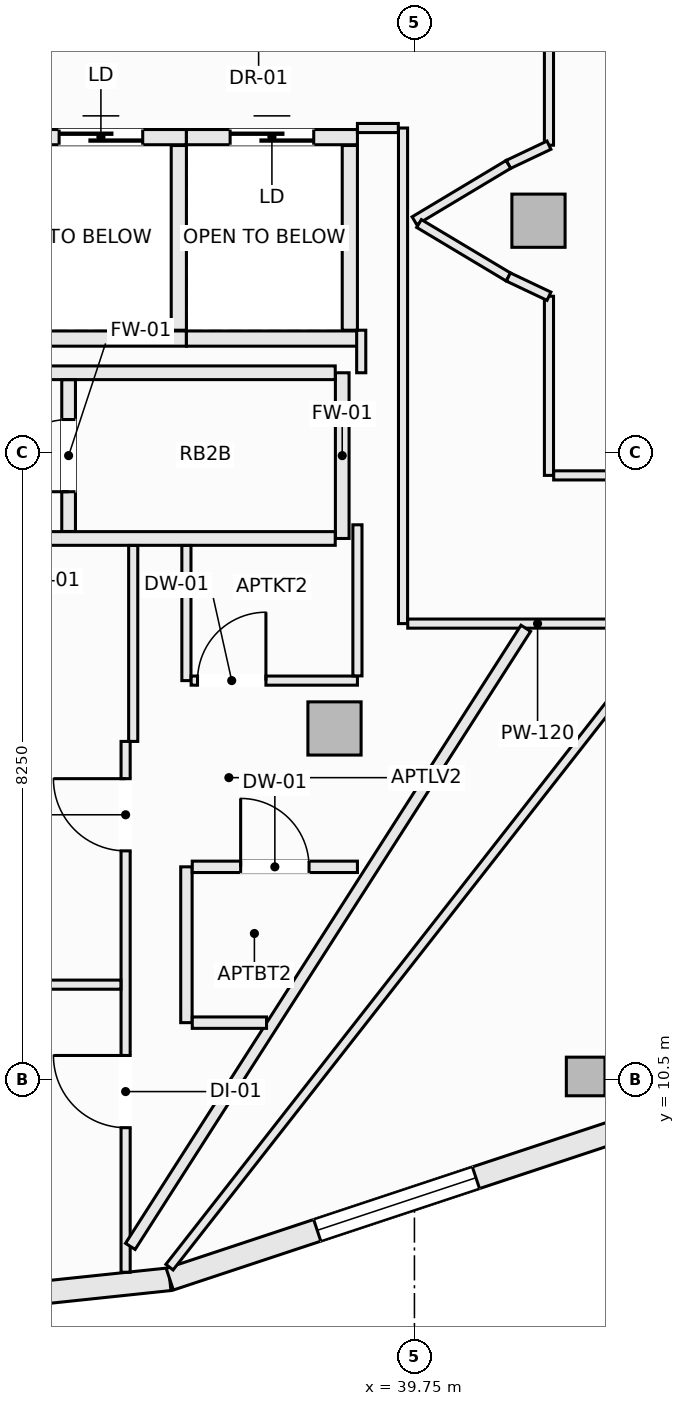
"""IFC4 building model, lengths in metres.
Left out: names, types, materials, properties, quantities, classifications, styles, units other than length and angle.
Written with IfcOpenShell. Run it as: python <this file> out.ifc"""

import sys

from ifc_helpers import new_model, si_unit, direction, frame, frame_2d, origin, origin_2d, place, context, subcontext, project, spatial, rectangle, hollow_rectangle, extrude, element, fill, save


model = new_model("IFC4")
c1 = context("Model", 3, precision=1e-05, world=origin(), true_north=direction((0.0, 1.0)))
c2 = subcontext(c1, "Body", "Model", "MODEL_VIEW")
j1 = project(units=[si_unit("LENGTHUNIT", "METRE"), si_unit("PLANEANGLEUNIT", "RADIAN")], contexts=[c1])
p1 = place(None, origin())
s1 = spatial("IfcSite", under=j1, at=p1, CompositionType="ELEMENT")
p2 = place(p1, origin())
s2 = spatial("IfcBuilding", under=s1, at=p2, CompositionType="ELEMENT")
p3 = place(p2, frame((0.0, 0.0, 209.6)))
s3 = spatial("IfcBuildingStorey", under=s2, at=p3, CompositionType="ELEMENT", Elevation=209.6)
p4 = place(p3, frame((42.003, 10.542, -0.27), z_axis=(0.0, 0.0, 1.0), x_axis=(1.0, 0.0, 0.0)))
e1 = element("IfcColumn", 1, at=p4, inside=s3, PredefinedType="COLUMN", context=c2, shape_type="SweptSolid", body=[
    extrude(hollow_rectangle(XDim=0.508, YDim=0.508, WallThickness=0.019, at=origin_2d()), origin(), (0.0, 0.0, 1.0), 3.3),
])
for number, where, z_axis, x_axis in (
    (2, (38.698, 15.121, -0.27), (0.0, 0.0, 1.0), (1.0, 0.0, 0.0)),
    (3, (41.382, 21.801, -0.27), (0.0, 0.0, 1.0), (1.0, 0.0, 0.0)),
):
    element("IfcColumn", number, at=place(p3, frame(where, z_axis=z_axis, x_axis=x_axis)), inside=s3, PredefinedType="COLUMN", context=c2, shape_type="SweptSolid", body=[
        extrude(rectangle(XDim=0.7, YDim=0.7, at=origin_2d()), origin(), (0.0, 0.0, 1.0), 3.3),
    ])
p5 = place(p3, frame((30.125, 7.2, 0.0), z_axis=(0.0, 0.0, 1.0), x_axis=(0.994497142298, 0.104763705363, 0.0)))
e4 = element("IfcWall", 4, at=p5, inside=s3, PredefinedType="SOLIDWALL", context=c2, shape_type="SweptSolid", body=[
    extrude(rectangle(XDim=6.441, YDim=0.3, at=frame_2d((3.221, 0.0))), origin(), (0.0, 0.0, 1.0), 2.605),
])
p6 = place(p5, frame((2.45, 0.0, 0.72)))
e5 = element("IfcOpeningElement", 5, at=p6, cuts=e4, PredefinedType="OPENING", context=c2, shape_type="SweptSolid", body=[
    extrude(rectangle(XDim=2.2, YDim=1.65, at=frame_2d((1.1, 0.825))), frame((0.0, 0.16, 0.0), z_axis=(0.0, -1.0, 0.0), x_axis=(1.0, 0.0, 0.0)), (0.0, 0.0, 1.0), 0.32),
])
p7 = place(p3, frame((36.531, 7.875, 0.0), z_axis=(0.0, 0.0, 1.0), x_axis=(0.949240877604, 0.314550085495, 0.0)))
e6 = element("IfcWall", 6, at=p7, inside=s3, PredefinedType="SOLIDWALL", context=c2, shape_type="SweptSolid", body=[
    extrude(rectangle(XDim=6.288, YDim=0.3, at=frame_2d((3.144, 0.0))), origin(), (0.0, 0.0, 1.0), 2.605),
])
p8 = place(p7, frame((2.044, 0.0, 0.72)))
e7 = element("IfcOpeningElement", 7, at=p8, cuts=e6, PredefinedType="OPENING", context=c2, shape_type="SweptSolid", body=[
    extrude(rectangle(XDim=2.2, YDim=1.65, at=frame_2d((1.1, 0.825))), frame((0.0, 0.16, 0.0), z_axis=(0.0, -1.0, 0.0), x_axis=(1.0, 0.0, 0.0)), (0.0, 0.0, 1.0), 0.32),
])
p9 = place(p3, frame((34.5, 22.9, 0.0), z_axis=(0.0, 0.0, 1.0), x_axis=(1.0, 0.0, 0.0)))
e8 = element("IfcWall", 8, at=p9, inside=s3, PredefinedType="SOLIDWALL", context=c2, shape_type="SweptSolid", body=[
    extrude(rectangle(XDim=2.25, YDim=0.2, at=frame_2d((1.125, 0.0))), origin(), (0.0, 0.0, 1.0), 3.03),
])
p10 = place(p9, frame((0.575, 0.0, 0.0)))
e9 = element("IfcOpeningElement", 9, at=p10, cuts=e8, PredefinedType="OPENING", context=c2, shape_type="SweptSolid", body=[
    extrude(rectangle(XDim=1.1, YDim=2.2, at=frame_2d((0.55, 1.1))), frame((0.0, 0.11, 0.0), z_axis=(0.0, -1.0, 0.0), x_axis=(1.0, 0.0, 0.0)), (0.0, 0.0, 1.0), 0.22),
])
p11 = place(p3, frame((34.5, 20.25, 0.0), z_axis=(0.0, 0.0, 1.0), x_axis=(1.0, 0.0, 0.0)))
e10 = element("IfcWall", 10, at=p11, inside=s3, PredefinedType="SOLIDWALL", context=c2, shape_type="SweptSolid", body=[
    extrude(rectangle(XDim=2.25, YDim=0.2, at=frame_2d((1.125, 0.0))), origin(), (0.0, 0.0, 1.0), 3.03),
])
p12 = place(p3, frame((36.65, 20.36, 0.0), z_axis=(0.0, 0.0, 1.0), x_axis=(0.0, 1.0, 0.0)))
e11 = element("IfcWall", 11, at=p12, inside=s3, PredefinedType="SOLIDWALL", context=c2, shape_type="SweptSolid", body=[
    extrude(rectangle(XDim=2.43, YDim=0.2, at=frame_2d((1.215, 0.0))), origin(), (0.0, 0.0, 1.0), 3.03),
])
p13 = place(p3, frame((36.75, 22.9, 0.0), z_axis=(0.0, 0.0, 1.0), x_axis=(1.0, 0.0, 0.0)))
e12 = element("IfcWall", 12, at=p13, inside=s3, PredefinedType="SOLIDWALL", context=c2, shape_type="SweptSolid", body=[
    extrude(rectangle(XDim=2.25, YDim=0.2, at=frame_2d((1.125, 0.0))), origin(), (0.0, 0.0, 1.0), 3.03),
])
p14 = place(p13, frame((0.575, 0.0, 0.0)))
e13 = element("IfcOpeningElement", 13, at=p14, cuts=e12, PredefinedType="OPENING", context=c2, shape_type="SweptSolid", body=[
    extrude(rectangle(XDim=1.1, YDim=2.2, at=frame_2d((0.55, 1.1))), frame((0.0, 0.11, 0.0), z_axis=(0.0, -1.0, 0.0), x_axis=(1.0, 0.0, 0.0)), (0.0, 0.0, 1.0), 0.22),
])
p15 = place(p3, frame((36.75, 20.25, 0.0), z_axis=(0.0, 0.0, 1.0), x_axis=(1.0, 0.0, 0.0)))
e14 = element("IfcWall", 14, at=p15, inside=s3, PredefinedType="SOLIDWALL", context=c2, shape_type="SweptSolid", body=[
    extrude(rectangle(XDim=2.25, YDim=0.2, at=frame_2d((1.125, 0.0))), origin(), (0.0, 0.0, 1.0), 3.03),
])
p16 = place(p3, frame((38.9, 20.36, 0.0), z_axis=(0.0, 0.0, 1.0), x_axis=(0.0, 1.0, 0.0)))
e15 = element("IfcWall", 15, at=p16, inside=s3, PredefinedType="SOLIDWALL", context=c2, shape_type="SweptSolid", body=[
    extrude(rectangle(XDim=2.43, YDim=0.2, at=frame_2d((1.215, 0.0))), origin(), (0.0, 0.0, 1.0), 3.03),
])
p17 = place(p3, frame((38.8, 17.62, 0.0), z_axis=(0.0, 0.0, 1.0), x_axis=(0.0, 1.0, 0.0)))
e16 = element("IfcWall", 16, at=p17, inside=s3, PredefinedType="SOLIDWALL", context=c2, shape_type="SweptSolid", body=[
    extrude(rectangle(XDim=2.18, YDim=0.18, at=frame_2d((1.09, 0.0))), origin(), (0.0, 0.0, 1.0), 3.03),
])
p18 = place(p3, frame((30.062, 17.62, 0.0), z_axis=(0.0, 0.0, 1.0), x_axis=(1.0, 0.0, 0.0)))
e17 = element("IfcWall", 17, at=p18, inside=s3, PredefinedType="SOLIDWALL", context=c2, shape_type="SweptSolid", body=[
    extrude(rectangle(XDim=8.646, YDim=0.18, at=frame_2d((4.323, 0.0))), origin(), (0.0, 0.0, 1.0), 3.03),
])
p19 = place(p18, frame((2.299, 0.0, 0.0)))
e18 = element("IfcOpeningElement", 18, at=p19, cuts=e17, PredefinedType="OPENING", context=c2, shape_type="SweptSolid", body=[
    extrude(rectangle(XDim=0.95, YDim=2.1, at=frame_2d((0.475, 1.05))), frame((0.0, 0.1, 0.0), z_axis=(0.0, -1.0, 0.0), x_axis=(1.0, 0.0, 0.0)), (0.0, 0.0, 1.0), 0.2),
])
p20 = place(p3, frame((30.062, 19.8, 0.0), z_axis=(0.0, 0.0, 1.0), x_axis=(1.0, 0.0, 0.0)))
e19 = element("IfcWall", 19, at=p20, inside=s3, PredefinedType="SOLIDWALL", context=c2, shape_type="SweptSolid", body=[
    extrude(rectangle(XDim=8.646, YDim=0.18, at=frame_2d((4.323, 0.0))), origin(), (0.0, 0.0, 1.0), 3.03),
])
p21 = place(p3, frame((35.2, 17.712, 0.0), z_axis=(0.0, 0.0, 1.0), x_axis=(0.0, 1.0, 0.0)))
e20 = element("IfcWall", 20, at=p21, inside=s3, PredefinedType="SOLIDWALL", context=c2, shape_type="SweptSolid", body=[
    extrude(rectangle(XDim=1.996, YDim=0.18, at=frame_2d((0.998, 0.0))), origin(), (0.0, 0.0, 1.0), 3.03),
])
p22 = place(p21, frame((0.523, 0.0, 0.0)))
e21 = element("IfcOpeningElement", 21, at=p22, cuts=e20, PredefinedType="OPENING", context=c2, shape_type="SweptSolid", body=[
    extrude(rectangle(XDim=0.95, YDim=2.1, at=frame_2d((0.475, 1.05))), frame((0.0, 0.1, 0.0), z_axis=(0.0, -1.0, 0.0), x_axis=(1.0, 0.0, 0.0)), (0.0, 0.0, 1.0), 0.2),
])
p23 = place(p3, frame((39.05, 19.8, 0.0), z_axis=(0.0, 0.0, 1.0), x_axis=(0.0, 1.0, 0.0)))
e22 = element("IfcWall", 22, at=p23, inside=s3, PredefinedType="PARTITIONING", context=c2, shape_type="SweptSolid", body=[
    extrude(rectangle(XDim=0.56, YDim=0.12, at=frame_2d((0.28, 0.0))), origin(), (0.0, 0.0, 1.0), 3.03),
])
p24 = place(p3, frame((39.6, 16.5, 0.0), z_axis=(0.0, 0.0, 1.0), x_axis=(0.0, 1.0, 0.0)))
e23 = element("IfcWall", 23, at=p24, inside=s3, PredefinedType="PARTITIONING", context=c2, shape_type="SweptSolid", body=[
    extrude(rectangle(XDim=6.52, YDim=0.12, at=frame_2d((3.26, 0.0))), origin(), (0.0, 0.0, 1.0), 2.478),
])
p25 = place(p3, frame((41.52, 18.45, 0.0), z_axis=(0.0, 0.0, 1.0), x_axis=(0.0, 1.0, 0.0)))
e24 = element("IfcWall", 24, at=p25, inside=s3, PredefinedType="PARTITIONING", context=c2, shape_type="SweptSolid", body=[
    extrude(rectangle(XDim=2.357, YDim=0.12, at=frame_2d((1.178, 0.0))), origin(), (0.0, 0.0, 1.0), 3.03),
])
p26 = place(p3, frame((41.52, 22.794, 0.0), z_axis=(0.0, 0.0, 1.0), x_axis=(0.0, 1.0, 0.0)))
e25 = element("IfcWall", 25, at=p26, inside=s3, PredefinedType="PARTITIONING", context=c2, shape_type="SweptSolid", body=[
    extrude(rectangle(XDim=4.654, YDim=0.12, at=frame_2d((2.327, 0.0))), origin(), (0.0, 0.0, 1.0), 2.478),
])
p27 = place(p26, frame((1.852, 0.0, 0.0)))
e26 = element("IfcOpeningElement", 26, at=p27, cuts=e25, PredefinedType="OPENING", context=c2, shape_type="SweptSolid", body=[
    extrude(rectangle(XDim=0.95, YDim=2.1, at=frame_2d((0.475, 1.05))), frame((0.0, 0.07, 0.0), z_axis=(0.0, -1.0, 0.0), x_axis=(1.0, 0.0, 0.0)), (0.0, 0.0, 1.0), 0.14),
])
p28 = place(p3, frame((40.986, 22.541, 0.0), z_axis=(0.0, 0.0, 1.0), x_axis=(0.903729424576, 0.428104107847, 0.0)))
e27 = element("IfcWall", 27, at=p28, inside=s3, PredefinedType="PARTITIONING", context=c2, shape_type="SweptSolid", body=[
    extrude(rectangle(XDim=0.591, YDim=0.12, at=frame_2d((0.295, 0.0))), origin(), (0.0, 0.0, 1.0), 3.03),
])
p29 = place(p3, frame((39.75, 21.8, 0.0), z_axis=(0.0, 0.0, 1.0), x_axis=(0.857702120906, 0.514146935996, 0.0)))
e28 = element("IfcWall", 28, at=p29, inside=s3, PredefinedType="PARTITIONING", context=c2, shape_type="SweptSolid", body=[
    extrude(rectangle(XDim=1.441, YDim=0.12, at=frame_2d((0.721, 0.0))), origin(), (0.0, 0.0, 1.0), 3.03),
])
p30 = place(p3, frame((39.81, 21.764, 0.0), z_axis=(0.0, 0.0, 1.0), x_axis=(0.858011245414, -0.513630901273, 0.0)))
e29 = element("IfcWall", 29, at=p30, inside=s3, PredefinedType="PARTITIONING", context=c2, shape_type="SweptSolid", body=[
    extrude(rectangle(XDim=1.37, YDim=0.12, at=frame_2d((0.685, 0.0))), origin(), (0.0, 0.0, 1.0), 3.03),
])
p31 = place(p3, frame((40.986, 21.06, 0.0), z_axis=(0.0, 0.0, 1.0), x_axis=(0.90356951601, -0.428441512621, 0.0)))
e30 = element("IfcWall", 30, at=p31, inside=s3, PredefinedType="PARTITIONING", context=c2, shape_type="SweptSolid", body=[
    extrude(rectangle(XDim=0.591, YDim=0.12, at=frame_2d((0.295, 0.0))), origin(), (0.0, 0.0, 1.0), 3.03),
])
p32 = place(p3, frame((41.582, 18.45, 0.0), z_axis=(0.0, 0.0, 1.0), x_axis=(1.0, 0.0, 0.0)))
e31 = element("IfcWall", 31, at=p32, inside=s3, PredefinedType="PARTITIONING", context=c2, shape_type="SweptSolid", body=[
    extrude(rectangle(XDim=3.105, YDim=0.12, at=frame_2d((1.552, 0.0))), origin(), (0.0, 0.0, 1.0), 3.03),
])
p33 = place(p32, frame((1.31, 0.0, 0.0)))
e32 = element("IfcOpeningElement", 32, at=p33, cuts=e31, PredefinedType="OPENING", context=c2, shape_type="SweptSolid", body=[
    extrude(rectangle(XDim=0.95, YDim=2.1, at=frame_2d((0.475, 1.05))), frame((0.0, 0.07, 0.0), z_axis=(0.0, -1.0, 0.0), x_axis=(1.0, 0.0, 0.0)), (0.0, 0.0, 1.0), 0.14),
])
p34 = place(p3, frame((36.527, 8.034, 0.0), z_axis=(0.0, 0.0, 1.0), x_axis=(0.616547497682, 0.787317714206, 0.0)))
e33 = element("IfcWall", 33, at=p34, inside=s3, PredefinedType="PARTITIONING", context=c2, shape_type="SweptSolid", body=[
    extrude(rectangle(XDim=13.151, YDim=0.12, at=frame_2d((6.576, 0.0))), origin(), (0.0, 0.0, 1.0), 3.03),
])
p35 = place(p34, frame((11.24, 0.0, 0.0)))
e34 = element("IfcOpeningElement", 34, at=p35, cuts=e33, PredefinedType="OPENING", context=c2, shape_type="SweptSolid", body=[
    extrude(rectangle(XDim=0.95, YDim=2.1, at=frame_2d((0.475, 1.05))), frame((0.0, 0.07, 0.0), z_axis=(0.0, -1.0, 0.0), x_axis=(1.0, 0.0, 0.0)), (0.0, 0.0, 1.0), 0.14),
])
p36 = place(p3, frame((39.662, 16.5, 0.0), z_axis=(0.0, 0.0, 1.0), x_axis=(1.0, 0.0, 0.0)))
e35 = element("IfcWall", 35, at=p36, inside=s3, PredefinedType="PARTITIONING", context=c2, shape_type="SweptSolid", body=[
    extrude(rectangle(XDim=3.416, YDim=0.12, at=frame_2d((1.708, 0.0))), origin(), (0.0, 0.0, 1.0), 2.712),
])
p37 = place(p3, frame((39.0, 23.02, 0.0), z_axis=(0.0, 0.0, 1.0), x_axis=(1.0, 0.0, 0.0)))
e36 = element("IfcWall", 36, at=p37, inside=s3, PredefinedType="PARTITIONING", context=c2, shape_type="SweptSolid", body=[
    extrude(rectangle(XDim=0.538, YDim=0.12, at=frame_2d((0.269, 0.0))), origin(), (0.0, 0.0, 1.0), 3.03),
])
p38 = place(p3, frame((36.05, 14.95, 0.0), z_axis=(0.0, 0.0, 1.0), x_axis=(0.0, 1.0, 0.0)))
e37 = element("IfcWall", 37, at=p38, inside=s3, PredefinedType="PARTITIONING", context=c2, shape_type="SweptSolid", body=[
    extrude(rectangle(XDim=2.578, YDim=0.12, at=frame_2d((1.289, 0.0))), origin(), (0.0, 0.0, 1.0), 3.03),
])
p39 = place(p3, frame((35.95, 7.966, 0.0), z_axis=(0.0, 0.0, 1.0), x_axis=(0.0, 1.0, 0.0)))
e38 = element("IfcWall", 38, at=p39, inside=s3, PredefinedType="PARTITIONING", context=c2, shape_type="SweptSolid", body=[
    extrude(rectangle(XDim=6.984, YDim=0.12, at=frame_2d((3.492, 0.0))), origin(), (0.0, 0.0, 1.0), 2.712),
])
p40 = place(p39, frame((5.544, 0.0, 0.0)))
e39 = element("IfcOpeningElement", 39, at=p40, cuts=e38, PredefinedType="OPENING", context=c2, shape_type="SweptSolid", body=[
    extrude(rectangle(XDim=0.95, YDim=2.1, at=frame_2d((0.475, 1.05))), frame((0.0, 0.07, 0.0), z_axis=(0.0, -1.0, 0.0), x_axis=(1.0, 0.0, 0.0)), (0.0, 0.0, 1.0), 0.14),
])
p41 = place(p39, frame((1.902, 0.0, 0.0)))
e40 = element("IfcOpeningElement", 40, at=p41, cuts=e38, PredefinedType="OPENING", context=c2, shape_type="SweptSolid", body=[
    extrude(rectangle(XDim=0.95, YDim=2.1, at=frame_2d((0.475, 1.05))), frame((0.0, 0.07, 0.0), z_axis=(0.0, -1.0, 0.0), x_axis=(1.0, 0.0, 0.0)), (0.0, 0.0, 1.0), 0.14),
])
p42 = place(p3, frame((32.034, 11.75, 0.0), z_axis=(0.0, 0.0, 1.0), x_axis=(1.0, 0.0, 0.0)))
e41 = element("IfcWall", 41, at=p42, inside=s3, PredefinedType="PARTITIONING", context=c2, shape_type="SweptSolid", body=[
    extrude(rectangle(XDim=3.854, YDim=0.12, at=frame_2d((1.927, 0.0))), origin(), (0.0, 0.0, 1.0), 3.03),
])
p43 = place(p3, frame((36.75, 11.25, 0.0), z_axis=(0.0, 0.0, 1.0), x_axis=(0.0, 1.0, 0.0)))
e42 = element("IfcWall", 42, at=p43, inside=s3, PredefinedType="PARTITIONING", context=c2, shape_type="SweptSolid", body=[
    extrude(rectangle(XDim=2.05, YDim=0.15, at=frame_2d((1.025, 0.0))), origin(), (0.0, 0.0, 1.0), 3.03),
])
p44 = place(p3, frame((36.75, 15.75, 0.0), z_axis=(0.0, 0.0, 1.0), x_axis=(0.0, 1.0, 0.0)))
e43 = element("IfcWall", 43, at=p44, inside=s3, PredefinedType="PARTITIONING", context=c2, shape_type="SweptSolid", body=[
    extrude(rectangle(XDim=1.778, YDim=0.12, at=frame_2d((0.889, 0.0))), origin(), (0.0, 0.0, 1.0), 3.03),
])
p45 = place(p3, frame((36.812, 15.75, 0.0), z_axis=(0.0, 0.0, 1.0), x_axis=(1.0, 0.0, 0.0)))
e44 = element("IfcWall", 44, at=p45, inside=s3, PredefinedType="PARTITIONING", context=c2, shape_type="SweptSolid", body=[
    extrude(rectangle(XDim=2.188, YDim=0.12, at=frame_2d((1.094, 0.0))), origin(), (0.0, 0.0, 1.0), 3.03),
])
p46 = place(p45, frame((0.084, 0.0, 0.0)))
e45 = element("IfcOpeningElement", 45, at=p46, cuts=e44, PredefinedType="OPENING", context=c2, shape_type="SweptSolid", body=[
    extrude(rectangle(XDim=0.9, YDim=2.1, at=frame_2d((0.45, 1.05))), frame((0.0, 0.07, 0.0), z_axis=(0.0, -1.0, 0.0), x_axis=(1.0, 0.0, 0.0)), (0.0, 0.0, 1.0), 0.14),
])
p47 = place(p3, frame((39.0, 15.812, 0.0), z_axis=(0.0, 0.0, 1.0), x_axis=(0.0, 1.0, 0.0)))
e46 = element("IfcWall", 46, at=p47, inside=s3, PredefinedType="PARTITIONING", context=c2, shape_type="SweptSolid", body=[
    extrude(rectangle(XDim=1.988, YDim=0.12, at=frame_2d((0.994, 0.0))), origin(), (0.0, 0.0, 1.0), 2.478),
])
p48 = place(p3, frame((36.012, 8.307, 0.0), z_axis=(0.0, 0.0, 1.0), x_axis=(0.539002742545, 0.842304008971, 0.0)))
e47 = element("IfcWall", 47, at=p48, inside=s3, PredefinedType="PARTITIONING", context=c2, shape_type="SweptSolid", body=[
    extrude(rectangle(XDim=9.654, YDim=0.15, at=frame_2d((4.827, 0.0))), origin(), (0.0, 0.0, 1.0), 3.03),
])
p49 = place(p3, frame((36.827, 13.3, 0.0), z_axis=(0.0, 0.0, 1.0), x_axis=(1.0, 0.0, 0.0)))
e48 = element("IfcWall", 48, at=p49, inside=s3, PredefinedType="PARTITIONING", context=c2, shape_type="SweptSolid", body=[
    extrude(rectangle(XDim=2.173, YDim=0.15, at=frame_2d((1.086, 0.0))), origin(), (0.0, 0.0, 1.0), 3.03),
])
p50 = place(p49, frame((0.636, 0.0, 0.0)))
e49 = element("IfcOpeningElement", 49, at=p50, cuts=e48, PredefinedType="OPENING", context=c2, shape_type="SweptSolid", body=[
    extrude(rectangle(XDim=0.9, YDim=2.1, at=frame_2d((0.45, 1.05))), frame((0.0, 0.085, 0.0), z_axis=(0.0, -1.0, 0.0), x_axis=(1.0, 0.0, 0.0)), (0.0, 0.0, 1.0), 0.17),
])
p51 = place(p3, frame((36.827, 11.25, 0.0), z_axis=(0.0, 0.0, 1.0), x_axis=(1.0, 0.0, 0.0)))
e50 = element("IfcWall", 50, at=p51, inside=s3, PredefinedType="PARTITIONING", context=c2, shape_type="SweptSolid", body=[
    extrude(rectangle(XDim=0.977, YDim=0.15, at=frame_2d((0.489, 0.0))), origin(), (0.0, 0.0, 1.0), 3.03),
])
p52 = place(p8, origin())
e51 = element("IfcWindow", 51, at=p52, inside=s3, PartitioningType="SINGLE_PANEL", PredefinedType="WINDOW", context=c2, shape_type="SweptSolid", body=[
    extrude(rectangle(XDim=2.2, YDim=1.65, at=frame_2d((1.1, 0.825))), frame((0.0, 0.03, 0.0), z_axis=(0.0, -1.0, 0.0), x_axis=(1.0, 0.0, 0.0)), (0.0, 0.0, 1.0), 0.06),
])
fill(e7, e51)
p53 = place(p10, origin())
e52 = element("IfcDoor", 52, at=p53, inside=s3, OperationType="SLIDING_TO_LEFT", PredefinedType="DOOR", context=c2, shape_type="SweptSolid", body=[
    extrude(rectangle(XDim=1.1, YDim=2.2, at=frame_2d((0.55, 1.1))), frame((0.0, 0.025, 0.0), z_axis=(0.0, -1.0, 0.0), x_axis=(1.0, 0.0, 0.0)), (0.0, 0.0, 1.0), 0.05),
])
fill(e9, e52)
p54 = place(p14, origin())
e53 = element("IfcDoor", 53, at=p54, inside=s3, OperationType="SLIDING_TO_LEFT", PredefinedType="DOOR", context=c2, shape_type="SweptSolid", body=[
    extrude(rectangle(XDim=1.1, YDim=2.2, at=frame_2d((0.55, 1.1))), frame((0.0, 0.025, 0.0), z_axis=(0.0, -1.0, 0.0), x_axis=(1.0, 0.0, 0.0)), (0.0, 0.0, 1.0), 0.05),
])
fill(e13, e53)
p55 = place(p40, origin())
e54 = element("IfcDoor", 54, at=p55, inside=s3, OperationType="SINGLE_SWING_RIGHT", PredefinedType="DOOR", context=c2, shape_type="SweptSolid", body=[
    extrude(rectangle(XDim=0.95, YDim=2.1, at=frame_2d((0.475, 1.05))), frame((0.0, 0.025, 0.0), z_axis=(0.0, -1.0, 0.0), x_axis=(1.0, 0.0, 0.0)), (0.0, 0.0, 1.0), 0.05),
])
fill(e39, e54)
p56 = place(p46, origin())
e55 = element("IfcDoor", 55, at=p56, inside=s3, OperationType="SINGLE_SWING_RIGHT", PredefinedType="DOOR", context=c2, shape_type="SweptSolid", body=[
    extrude(rectangle(XDim=0.9, YDim=2.1, at=frame_2d((0.45, 1.05))), frame((0.0, 0.025, 0.0), z_axis=(0.0, -1.0, 0.0), x_axis=(1.0, 0.0, 0.0)), (0.0, 0.0, 1.0), 0.05),
])
fill(e45, e55)
p57 = place(p50, origin())
e56 = element("IfcDoor", 56, at=p57, inside=s3, OperationType="SINGLE_SWING_LEFT", PredefinedType="DOOR", context=c2, shape_type="SweptSolid", body=[
    extrude(rectangle(XDim=0.9, YDim=2.1, at=frame_2d((0.45, 1.05))), frame((0.0, 0.025, 0.0), z_axis=(0.0, -1.0, 0.0), x_axis=(1.0, 0.0, 0.0)), (0.0, 0.0, 1.0), 0.05),
])
fill(e49, e56)
p58 = place(p41, origin())
e57 = element("IfcDoor", 57, at=p58, inside=s3, OperationType="SINGLE_SWING_RIGHT", PredefinedType="DOOR", context=c2, shape_type="SweptSolid", body=[
    extrude(rectangle(XDim=0.95, YDim=2.1, at=frame_2d((0.475, 1.05))), frame((0.0, 0.025, 0.0), z_axis=(0.0, -1.0, 0.0), x_axis=(1.0, 0.0, 0.0)), (0.0, 0.0, 1.0), 0.05),
])
fill(e40, e57)
p59 = place(p22, origin())
e58 = element("IfcDoor", 58, at=p59, inside=s3, OperationType="SINGLE_SWING_LEFT", PredefinedType="DOOR", context=c2, shape_type="SweptSolid", body=[
    extrude(rectangle(XDim=0.95, YDim=2.1, at=frame_2d((0.475, 1.05))), frame((0.0, 0.025, 0.0), z_axis=(0.0, -1.0, 0.0), x_axis=(1.0, 0.0, 0.0)), (0.0, 0.0, 1.0), 0.05),
])
fill(e21, e58)
save(model, sys.argv[1])
